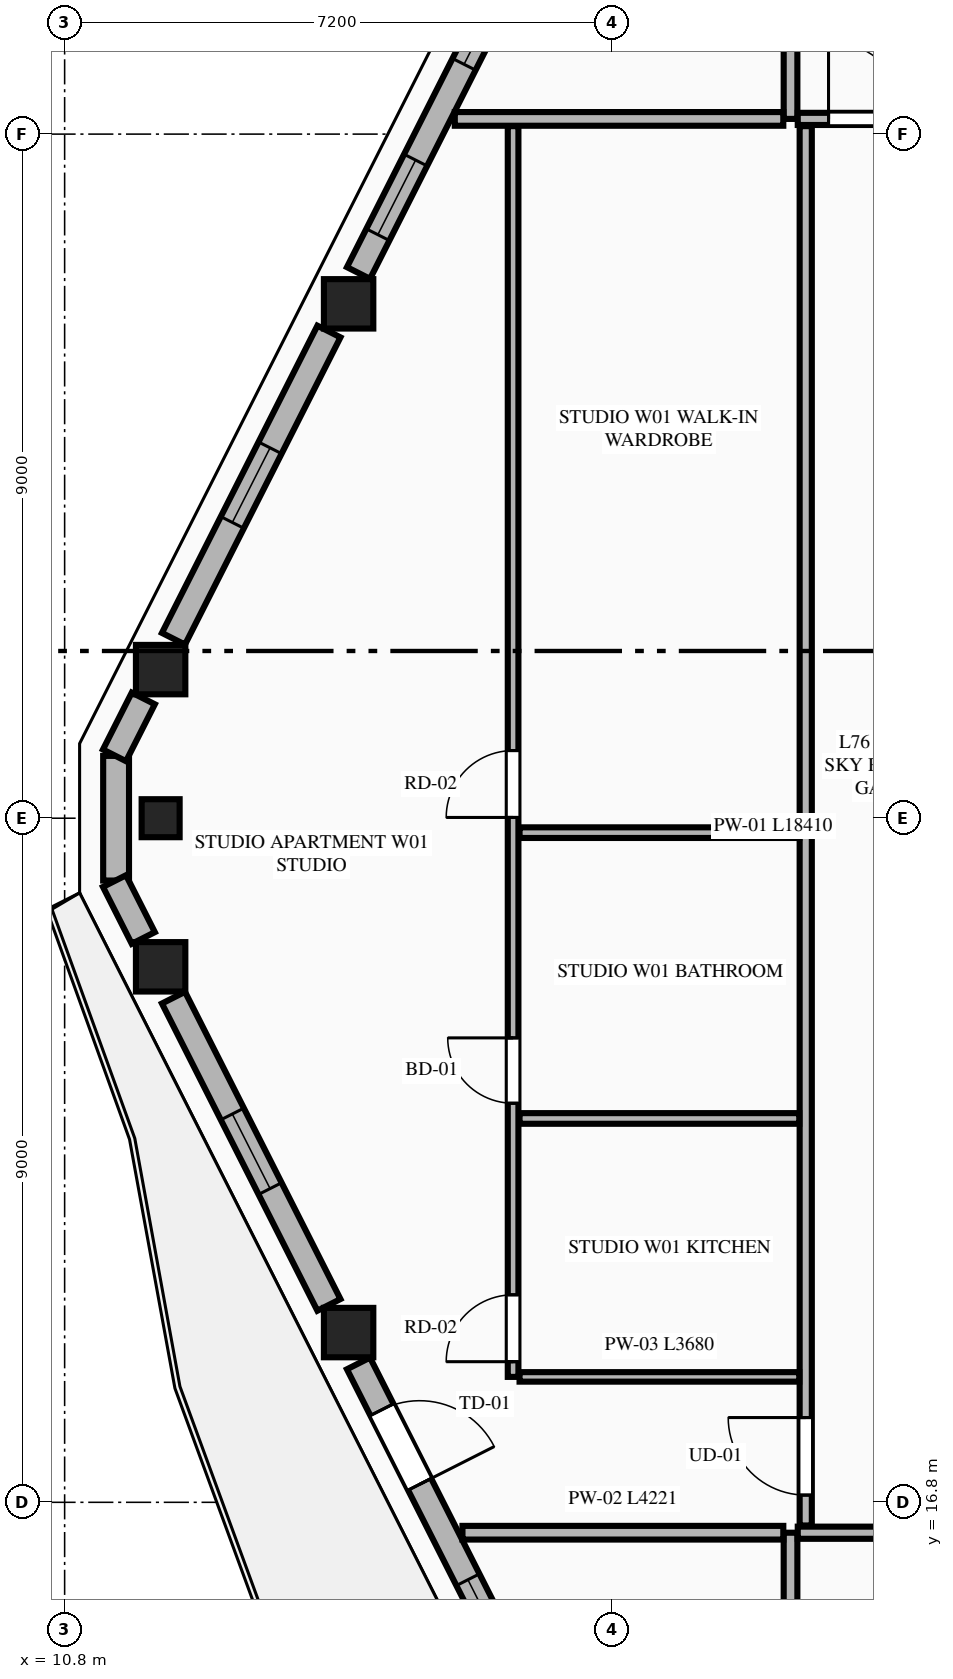
"""IFC4 building model, lengths in metres.
Left out: names, types, materials, properties, quantities, classifications, styles, units other than length and angle.
Written with IfcOpenShell. Run it as: python <this file> out.ifc"""

import sys

from ifc_helpers import new_model, si_unit, direction, frame, frame_2d, origin, origin_2d, place, context, subcontext, project, spatial, rectangle, extrude, element, fill, save


model = new_model("IFC4")
c1 = context("Model", 3, precision=1e-05, world=origin(), true_north=direction((0.0, 1.0)))
c2 = subcontext(c1, "Body", "Model", "MODEL_VIEW")
j1 = project(units=[si_unit("LENGTHUNIT", "METRE"), si_unit("PLANEANGLEUNIT", "RADIAN")], contexts=[c1])
p1 = place(None, origin())
s1 = spatial("IfcSite", under=j1, at=p1, CompositionType="ELEMENT")
p2 = place(p1, origin())
s2 = spatial("IfcBuilding", under=s1, at=p2, CompositionType="ELEMENT")
p3 = place(p2, frame((0.0, 0.0, 287.5)))
s3 = spatial("IfcBuildingStorey", under=s2, at=p3, CompositionType="ELEMENT", Elevation=287.5)
for number, where, z_axis, x_axis in (
    (1, (14.536, 32.567, 0.0), (0.0, 0.0, 1.0), (1.0, 0.0, 0.0)),
    (2, (12.063, 27.755, 0.0), (0.0, 0.0, 1.0), (1.0, 0.0, 0.0)),
    (3, (12.063, 23.845, 0.0), (0.0, 0.0, 1.0), (1.0, 0.0, 0.0)),
    (4, (14.536, 19.033, 0.0), (0.0, 0.0, 1.0), (1.0, 0.0, 0.0)),
):
    element("IfcColumn", number, at=place(p3, frame(where, z_axis=z_axis, x_axis=x_axis)), inside=s3, PredefinedType="COLUMN", context=c2, shape_type="SweptSolid", body=[
        extrude(rectangle(XDim=0.65, YDim=0.65, at=origin_2d()), origin(), (0.0, 0.0, 1.0), 4.0),
    ])
p4 = place(p3, frame((12.063, 25.8, 0.0), z_axis=(0.0, 0.0, 1.0), x_axis=(0.0, -1.0, 0.0)))
e5 = element("IfcColumn", 5, at=p4, inside=s3, PredefinedType="PILASTER", context=c2, shape_type="SweptSolid", body=[
    extrude(rectangle(XDim=0.5, YDim=0.35, at=origin_2d()), origin(), (0.0, 0.0, 1.0), 4.0),
])
p5 = place(p3, frame((11.477, 26.62, 0.0), z_axis=(0.0, 0.0, 1.0), x_axis=(0.0, -1.0, 0.0)))
e6 = element("IfcWall", 6, at=p5, inside=s3, PredefinedType="STANDARD", context=c2, shape_type="SweptSolid", body=[
    extrude(rectangle(XDim=1.64, YDim=0.34, at=frame_2d((0.82, 0.0))), origin(), (0.0, 0.0, 1.0), 3.8),
])
p6 = place(p3, frame((16.798, 37.187, 0.0), z_axis=(0.0, 0.0, 1.0), x_axis=(-0.451447516904, -0.892297674255, 0.0)))
e7 = element("IfcWall", 7, at=p6, inside=s3, PredefinedType="STANDARD", context=c2, shape_type="SweptSolid", body=[
    extrude(rectangle(XDim=4.723, YDim=0.34, at=frame_2d((2.361, 0.0))), origin(), (0.0, 0.0, 1.0), 2.99),
])
p7 = place(p6, frame((0.546, 0.0, 0.75)))
e8 = element("IfcOpeningElement", 8, at=p7, cuts=e7, PredefinedType="OPENING", context=c2, shape_type="SweptSolid", body=[
    extrude(rectangle(XDim=1.1, YDim=2.0, at=frame_2d((0.55, 1.0))), frame((0.0, 0.18, 0.0), z_axis=(0.0, -1.0, 0.0), x_axis=(1.0, 0.0, 0.0)), (0.0, 0.0, 1.0), 0.36),
])
p8 = place(p6, frame((3.058, 0.0, 0.75)))
e9 = element("IfcOpeningElement", 9, at=p8, cuts=e7, PredefinedType="OPENING", context=c2, shape_type="SweptSolid", body=[
    extrude(rectangle(XDim=1.1, YDim=2.0, at=frame_2d((0.55, 1.0))), frame((0.0, 0.18, 0.0), z_axis=(0.0, -1.0, 0.0), x_axis=(1.0, 0.0, 0.0)), (0.0, 0.0, 1.0), 0.36),
])
p9 = place(p3, frame((14.277, 32.203, 0.0), z_axis=(0.0, 0.0, 1.0), x_axis=(-0.45147697324, -0.892282770558, 0.0)))
e10 = element("IfcWall", 10, at=p9, inside=s3, PredefinedType="STANDARD", context=c2, shape_type="SweptSolid", body=[
    extrude(rectangle(XDim=4.53, YDim=0.34, at=frame_2d((2.265, 0.0))), origin(), (0.0, 0.0, 1.0), 2.99),
])
p10 = place(p9, frame((1.715, 0.0, 0.75)))
e11 = element("IfcOpeningElement", 11, at=p10, cuts=e10, PredefinedType="OPENING", context=c2, shape_type="SweptSolid", body=[
    extrude(rectangle(XDim=1.1, YDim=2.0, at=frame_2d((0.55, 1.0))), frame((0.0, 0.18, 0.0), z_axis=(0.0, -1.0, 0.0), x_axis=(1.0, 0.0, 0.0)), (0.0, 0.0, 1.0), 0.36),
])
p11 = place(p3, frame((11.835, 27.376, 0.0), z_axis=(0.0, 0.0, 1.0), x_axis=(-0.45139691133, -0.892323275748, 0.0)))
e12 = element("IfcWall", 12, at=p11, inside=s3, PredefinedType="STANDARD", context=c2, shape_type="SweptSolid", body=[
    extrude(rectangle(XDim=0.839, YDim=0.34, at=frame_2d((0.42, 0.0))), origin(), (0.0, 0.0, 1.0), 3.8),
])
p12 = place(p3, frame((11.456, 24.973, 0.0), z_axis=(0.0, 0.0, 1.0), x_axis=(0.4515140893, -0.892263989615, 0.0)))
e13 = element("IfcWall", 13, at=p12, inside=s3, PredefinedType="STANDARD", context=c2, shape_type="SweptSolid", body=[
    extrude(rectangle(XDim=0.839, YDim=0.34, at=frame_2d((0.419, 0.0))), origin(), (0.0, 0.0, 1.0), 3.8),
])
p13 = place(p3, frame((12.232, 23.439, 0.0), z_axis=(0.0, 0.0, 1.0), x_axis=(0.45147697324, -0.892282770558, 0.0)))
e14 = element("IfcWall", 14, at=p13, inside=s3, PredefinedType="STANDARD", context=c2, shape_type="SweptSolid", body=[
    extrude(rectangle(XDim=4.53, YDim=0.34, at=frame_2d((2.265, 0.0))), origin(), (0.0, 0.0, 1.0), 2.99),
])
p14 = place(p13, frame((1.715, 0.0, 0.75)))
e15 = element("IfcOpeningElement", 15, at=p14, cuts=e14, PredefinedType="OPENING", context=c2, shape_type="SweptSolid", body=[
    extrude(rectangle(XDim=1.1, YDim=2.0, at=frame_2d((0.55, 1.0))), frame((0.0, 0.18, 0.0), z_axis=(0.0, -1.0, 0.0), x_axis=(1.0, 0.0, 0.0)), (0.0, 0.0, 1.0), 0.36),
])
p15 = place(p3, frame((14.666, 18.627, 0.0), z_axis=(0.0, 0.0, 1.0), x_axis=(0.451468341582, -0.892287137949, 0.0)))
e16 = element("IfcWall", 16, at=p15, inside=s3, PredefinedType="STANDARD", context=c2, shape_type="SweptSolid", body=[
    extrude(rectangle(XDim=4.723, YDim=0.34, at=frame_2d((2.361, 0.0))), origin(), (0.0, 0.0, 1.0), 2.99),
])
p16 = place(p15, frame((0.682, 0.0, 0.0)))
e17 = element("IfcOpeningElement", 17, at=p16, cuts=e16, PredefinedType="OPENING", context=c2, shape_type="SweptSolid", body=[
    extrude(rectangle(XDim=1.1, YDim=2.25, at=frame_2d((0.55, 1.125))), frame((0.0, 0.18, 0.0), z_axis=(0.0, -1.0, 0.0), x_axis=(1.0, 0.0, 0.0)), (0.0, 0.0, 1.0), 0.36),
])
p17 = place(p15, frame((3.189, 0.0, 0.75)))
e18 = element("IfcOpeningElement", 18, at=p17, cuts=e16, PredefinedType="OPENING", context=c2, shape_type="SweptSolid", body=[
    extrude(rectangle(XDim=1.1, YDim=2.0, at=frame_2d((0.55, 1.0))), frame((0.0, 0.18, 0.0), z_axis=(0.0, -1.0, 0.0), x_axis=(1.0, 0.0, 0.0)), (0.0, 0.0, 1.0), 0.36),
])
p18 = place(p3, frame((20.35, 8.119, 0.0), z_axis=(0.0, 0.0, 1.0), x_axis=(0.0, 1.0, 0.0)))
e19 = element("IfcWall", 19, at=p18, inside=s3, PredefinedType="PARTITIONING", context=c2, shape_type="SweptSolid", body=[
    extrude(rectangle(XDim=8.281, YDim=0.18, at=frame_2d((4.141, 0.0))), origin(), (0.0, 0.0, 1.0), 3.8),
])
p19 = place(p3, frame((20.445, 16.4, 0.0), z_axis=(0.0, 0.0, 1.0), x_axis=(1.0, 0.0, 0.0)))
e20 = element("IfcWall", 20, at=p19, inside=s3, PredefinedType="PARTITIONING", context=c2, shape_type="SweptSolid", body=[
    extrude(rectangle(XDim=23.91, YDim=0.16, at=frame_2d((11.955, 0.0))), origin(), (0.0, 0.0, 1.0), 3.8),
])
p20 = place(p19, frame((21.705, 0.0, 0.0)))
e21 = element("IfcOpeningElement", 21, at=p20, cuts=e20, PredefinedType="OPENING", context=c2, shape_type="SweptSolid", body=[
    extrude(rectangle(XDim=1.02, YDim=2.25, at=frame_2d((0.51, 1.125))), frame((0.0, 0.09, 0.0), z_axis=(0.0, -1.0, 0.0), x_axis=(1.0, 0.0, 0.0)), (0.0, 0.0, 1.0), 0.18),
])
p21 = place(p3, frame((20.35, 35.0, 0.0), z_axis=(0.0, 0.0, 1.0), x_axis=(0.0, 1.0, 0.0)))
e22 = element("IfcWall", 22, at=p21, inside=s3, PredefinedType="PARTITIONING", context=c2, shape_type="SweptSolid", body=[
    extrude(rectangle(XDim=8.481, YDim=0.18, at=frame_2d((4.24, 0.0))), origin(), (0.0, 0.0, 1.0), 3.8),
])
p22 = place(p3, frame((20.445, 35.0, 0.0), z_axis=(0.0, 0.0, 1.0), x_axis=(1.0, 0.0, 0.0)))
e23 = element("IfcWall", 23, at=p22, inside=s3, PredefinedType="PARTITIONING", context=c2, shape_type="SweptSolid", body=[
    extrude(rectangle(XDim=8.606, YDim=0.16, at=frame_2d((4.303, 0.0))), origin(), (0.0, 0.0, 1.0), 3.8),
])
p23 = place(p22, frame((0.405, 0.0, 0.0)))
e24 = element("IfcOpeningElement", 24, at=p23, cuts=e23, PredefinedType="OPENING", context=c2, shape_type="SweptSolid", body=[
    extrude(rectangle(XDim=1.02, YDim=2.25, at=frame_2d((0.51, 1.125))), frame((0.0, 0.09, 0.0), z_axis=(0.0, -1.0, 0.0), x_axis=(1.0, 0.0, 0.0)), (0.0, 0.0, 1.0), 0.18),
])
p24 = place(p3, frame((16.034, 16.4, 0.0), z_axis=(0.0, 0.0, 1.0), x_axis=(1.0, 0.0, 0.0)))
e25 = element("IfcWall", 25, at=p24, inside=s3, PredefinedType="PARTITIONING", context=c2, shape_type="SweptSolid", body=[
    extrude(rectangle(XDim=4.221, YDim=0.18, at=frame_2d((2.11, 0.0))), origin(), (0.0, 0.0, 1.0), 3.8),
])
p25 = place(p3, frame((15.933, 35.0, 0.0), z_axis=(0.0, 0.0, 1.0), x_axis=(1.0, 0.0, 0.0)))
e26 = element("IfcWall", 26, at=p25, inside=s3, PredefinedType="PARTITIONING", context=c2, shape_type="SweptSolid", body=[
    extrude(rectangle(XDim=4.322, YDim=0.18, at=frame_2d((2.161, 0.0))), origin(), (0.0, 0.0, 1.0), 3.8),
])
p26 = place(p3, frame((20.55, 16.495, 0.0), z_axis=(0.0, 0.0, 1.0), x_axis=(0.0, 1.0, 0.0)))
e27 = element("IfcWall", 27, at=p26, inside=s3, PredefinedType="PARTITIONING", context=c2, shape_type="SweptSolid", body=[
    extrude(rectangle(XDim=18.41, YDim=0.16, at=frame_2d((9.205, 0.0))), origin(), (0.0, 0.0, 1.0), 3.487),
])
p27 = place(p26, frame((0.4, 0.0, 0.0)))
e28 = element("IfcOpeningElement", 28, at=p27, cuts=e27, PredefinedType="OPENING", context=c2, shape_type="SweptSolid", body=[
    extrude(rectangle(XDim=1.02, YDim=2.25, at=frame_2d((0.51, 1.125))), frame((0.0, 0.09, 0.0), z_axis=(0.0, -1.0, 0.0), x_axis=(1.0, 0.0, 0.0)), (0.0, 0.0, 1.0), 0.18),
])
p28 = place(p3, frame((16.785, 18.45, 0.0), z_axis=(0.0, 0.0, 1.0), x_axis=(1.0, 0.0, 0.0)))
e29 = element("IfcWall", 29, at=p28, inside=s3, PredefinedType="PARTITIONING", context=c2, shape_type="SweptSolid", body=[
    extrude(rectangle(XDim=3.68, YDim=0.125, at=frame_2d((1.84, 0.0))), origin(), (0.0, 0.0, 1.0), 3.8),
])
p29 = place(p3, frame((16.7, 18.45, 0.0), z_axis=(0.0, 0.0, 1.0), x_axis=(0.0, 1.0, 0.0)))
e30 = element("IfcWall", 30, at=p29, inside=s3, PredefinedType="PLUMBINGWALL", context=c2, shape_type="SweptSolid", body=[
    extrude(rectangle(XDim=16.455, YDim=0.14, at=frame_2d((8.228, 0.0))), origin(), (0.0, 0.0, 1.0), 3.8),
])
p30 = place(p29, frame((3.6, 0.0, 0.0)))
e31 = element("IfcOpeningElement", 31, at=p30, cuts=e30, PredefinedType="OPENING", context=c2, shape_type="SweptSolid", body=[
    extrude(rectangle(XDim=0.86, YDim=2.1, at=frame_2d((0.43, 1.05))), frame((0.0, 0.08, 0.0), z_axis=(0.0, -1.0, 0.0), x_axis=(1.0, 0.0, 0.0)), (0.0, 0.0, 1.0), 0.16),
])
p31 = place(p29, frame((7.36, 0.0, 0.0)))
e32 = element("IfcOpeningElement", 32, at=p31, cuts=e30, PredefinedType="OPENING", context=c2, shape_type="SweptSolid", body=[
    extrude(rectangle(XDim=0.88, YDim=2.15, at=frame_2d((0.44, 1.075))), frame((0.0, 0.08, 0.0), z_axis=(0.0, -1.0, 0.0), x_axis=(1.0, 0.0, 0.0)), (0.0, 0.0, 1.0), 0.16),
])
p32 = place(p29, frame((0.2, 0.0, 0.0)))
e33 = element("IfcOpeningElement", 33, at=p32, cuts=e30, PredefinedType="OPENING", context=c2, shape_type="SweptSolid", body=[
    extrude(rectangle(XDim=0.88, YDim=2.15, at=frame_2d((0.44, 1.075))), frame((0.0, 0.08, 0.0), z_axis=(0.0, -1.0, 0.0), x_axis=(1.0, 0.0, 0.0)), (0.0, 0.0, 1.0), 0.16),
])
for number, where, z_axis, x_axis in (
    (34, (16.785, 21.85, 0.0), (0.0, 0.0, 1.0), (1.0, 0.0, 0.0)),
    (35, (16.785, 25.61, 0.0), (0.0, 0.0, 1.0), (1.0, 0.0, 0.0)),
):
    element("IfcWall", number, at=place(p3, frame(where, z_axis=z_axis, x_axis=x_axis)), inside=s3, PredefinedType="PLUMBINGWALL", context=c2, shape_type="SweptSolid", body=[
        extrude(rectangle(XDim=3.68, YDim=0.14, at=frame_2d((1.84, 0.0))), origin(), (0.0, 0.0, 1.0), 3.8),
    ])
p33 = place(p7, origin())
e36 = element("IfcWindow", 36, at=p33, inside=s3, PartitioningType="SINGLE_PANEL", PredefinedType="WINDOW", context=c2, shape_type="SweptSolid", body=[
    extrude(rectangle(XDim=1.1, YDim=2.0, at=frame_2d((0.55, 1.0))), frame((0.0, 0.03, 0.0), z_axis=(0.0, -1.0, 0.0), x_axis=(1.0, 0.0, 0.0)), (0.0, 0.0, 1.0), 0.06),
])
fill(e8, e36)
p34 = place(p10, origin())
e37 = element("IfcWindow", 37, at=p34, inside=s3, PartitioningType="SINGLE_PANEL", PredefinedType="WINDOW", context=c2, shape_type="SweptSolid", body=[
    extrude(rectangle(XDim=1.1, YDim=2.0, at=frame_2d((0.55, 1.0))), frame((0.0, 0.03, 0.0), z_axis=(0.0, -1.0, 0.0), x_axis=(1.0, 0.0, 0.0)), (0.0, 0.0, 1.0), 0.06),
])
fill(e11, e37)
p35 = place(p14, origin())
e38 = element("IfcWindow", 38, at=p35, inside=s3, PartitioningType="SINGLE_PANEL", PredefinedType="WINDOW", context=c2, shape_type="SweptSolid", body=[
    extrude(rectangle(XDim=1.1, YDim=2.0, at=frame_2d((0.55, 1.0))), frame((0.0, 0.03, 0.0), z_axis=(0.0, -1.0, 0.0), x_axis=(1.0, 0.0, 0.0)), (0.0, 0.0, 1.0), 0.06),
])
fill(e15, e38)
p36 = place(p16, origin())
e39 = element("IfcDoor", 39, at=p36, inside=s3, OperationType="SINGLE_SWING_RIGHT", PredefinedType="DOOR", context=c2, shape_type="SweptSolid", body=[
    extrude(rectangle(XDim=1.1, YDim=2.25, at=frame_2d((0.55, 1.125))), frame((0.0, 0.025, 0.0), z_axis=(0.0, -1.0, 0.0), x_axis=(1.0, 0.0, 0.0)), (0.0, 0.0, 1.0), 0.05),
])
fill(e17, e39)
p37 = place(p23, origin())
e40 = element("IfcDoor", 40, at=p37, inside=s3, OperationType="SINGLE_SWING_LEFT", PredefinedType="DOOR", context=c2, shape_type="SweptSolid", body=[
    extrude(rectangle(XDim=1.02, YDim=2.25, at=frame_2d((0.51, 1.125))), frame((0.0, 0.025, 0.0), z_axis=(0.0, -1.0, 0.0), x_axis=(1.0, 0.0, 0.0)), (0.0, 0.0, 1.0), 0.05),
])
fill(e24, e40)
p38 = place(p30, origin())
e41 = element("IfcDoor", 41, at=p38, inside=s3, OperationType="SINGLE_SWING_RIGHT", PredefinedType="DOOR", context=c2, shape_type="SweptSolid", body=[
    extrude(rectangle(XDim=0.86, YDim=2.1, at=frame_2d((0.43, 1.05))), frame((0.0, 0.025, 0.0), z_axis=(0.0, -1.0, 0.0), x_axis=(1.0, 0.0, 0.0)), (0.0, 0.0, 1.0), 0.05),
])
fill(e31, e41)
p39 = place(p31, origin())
e42 = element("IfcDoor", 42, at=p39, inside=s3, OperationType="SINGLE_SWING_LEFT", PredefinedType="DOOR", context=c2, shape_type="SweptSolid", body=[
    extrude(rectangle(XDim=0.88, YDim=2.15, at=frame_2d((0.44, 1.075))), frame((0.0, 0.025, 0.0), z_axis=(0.0, -1.0, 0.0), x_axis=(1.0, 0.0, 0.0)), (0.0, 0.0, 1.0), 0.05),
])
fill(e32, e42)
p40 = place(p27, origin())
e43 = element("IfcDoor", 43, at=p40, inside=s3, OperationType="SINGLE_SWING_RIGHT", PredefinedType="DOOR", context=c2, shape_type="SweptSolid", body=[
    extrude(rectangle(XDim=1.02, YDim=2.25, at=frame_2d((0.51, 1.125))), frame((0.0, 0.025, 0.0), z_axis=(0.0, -1.0, 0.0), x_axis=(1.0, 0.0, 0.0)), (0.0, 0.0, 1.0), 0.05),
])
fill(e28, e43)
p41 = place(p32, origin())
e44 = element("IfcDoor", 44, at=p41, inside=s3, OperationType="SINGLE_SWING_LEFT", PredefinedType="DOOR", context=c2, shape_type="SweptSolid", body=[
    extrude(rectangle(XDim=0.88, YDim=2.15, at=frame_2d((0.44, 1.075))), frame((0.0, 0.025, 0.0), z_axis=(0.0, -1.0, 0.0), x_axis=(1.0, 0.0, 0.0)), (0.0, 0.0, 1.0), 0.05),
])
fill(e33, e44)
p42 = place(p8, origin())
e45 = element("IfcWindow", 45, at=p42, inside=s3, PartitioningType="SINGLE_PANEL", PredefinedType="WINDOW", context=c2, shape_type="SweptSolid", body=[
    extrude(rectangle(XDim=1.1, YDim=2.0, at=frame_2d((0.55, 1.0))), frame((0.0, 0.03, 0.0), z_axis=(0.0, -1.0, 0.0), x_axis=(1.0, 0.0, 0.0)), (0.0, 0.0, 1.0), 0.06),
])
fill(e9, e45)
p43 = place(p17, origin())
e46 = element("IfcWindow", 46, at=p43, inside=s3, PartitioningType="SINGLE_PANEL", PredefinedType="WINDOW", context=c2, shape_type="SweptSolid", body=[
    extrude(rectangle(XDim=1.1, YDim=2.0, at=frame_2d((0.55, 1.0))), frame((0.0, 0.03, 0.0), z_axis=(0.0, -1.0, 0.0), x_axis=(1.0, 0.0, 0.0)), (0.0, 0.0, 1.0), 0.06),
])
fill(e18, e46)
save(model, sys.argv[1])
